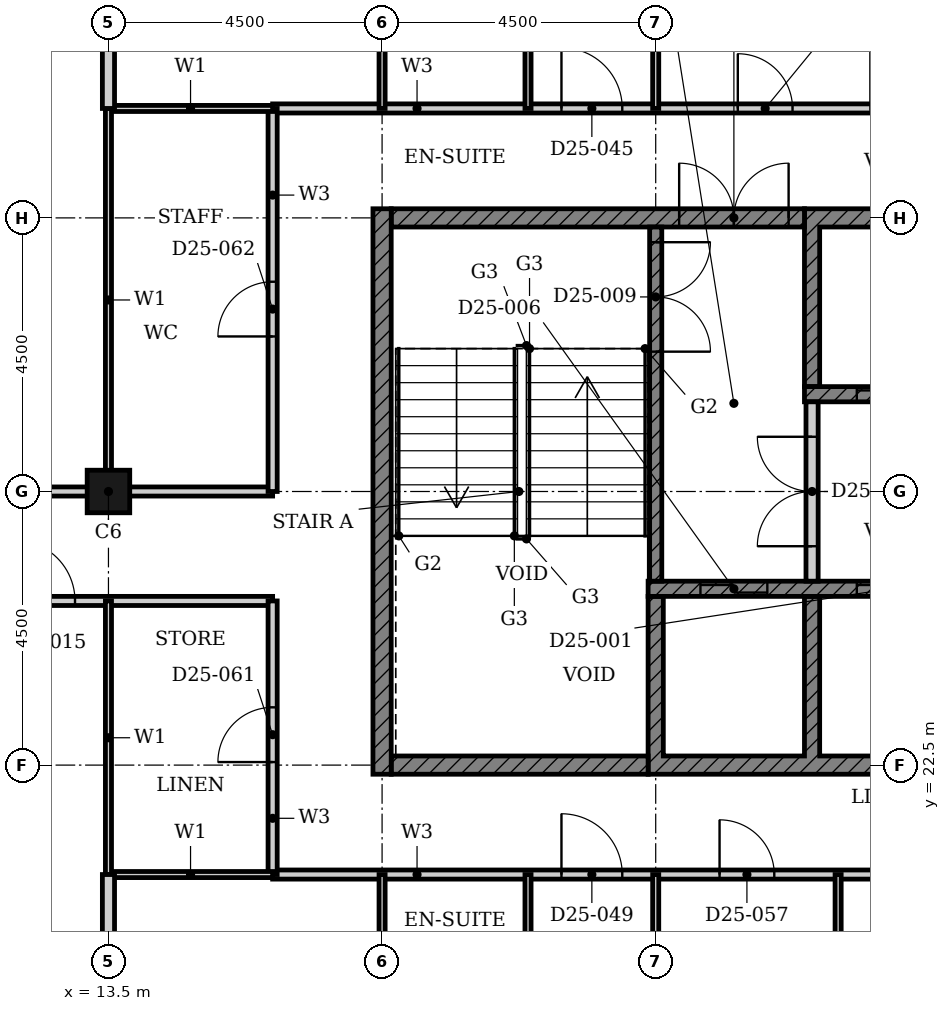
"""IFC4 building model, lengths in metres.
Left out: names, types, materials, properties, quantities, classifications, styles, units other than length and angle.
Written with IfcOpenShell. Run it as: python <this file> out.ifc"""

import sys

from ifc_helpers import new_model, si_unit, direction, frame, frame_2d, origin, origin_2d, place, context, subcontext, project, spatial, polyline, rectangle, hollow_rectangle, outline, extrude, element, fill, save


model = new_model("IFC4")
c1 = context("Model", 3, precision=1e-05, world=origin(), true_north=direction((0.0, 1.0)))
c2 = subcontext(c1, "Body", "Model", "MODEL_VIEW")
j1 = project(units=[si_unit("LENGTHUNIT", "METRE"), si_unit("PLANEANGLEUNIT", "RADIAN")], contexts=[c1])
p1 = place(None, origin())
s1 = spatial("IfcSite", under=j1, at=p1, CompositionType="ELEMENT")
p2 = place(p1, origin())
s2 = spatial("IfcBuilding", under=s1, at=p2, CompositionType="ELEMENT")
p3 = place(p2, frame((0.0, 0.0, 104.4)))
s3 = spatial("IfcBuildingStorey", under=s2, at=p3, CompositionType="ELEMENT", Elevation=104.4)
p4 = place(p3, frame((13.5, 27.0, 0.0), z_axis=(0.0, 0.0, 1.0), x_axis=(1.0, 0.0, 0.0)))
e1 = element("IfcColumn", 1, at=p4, inside=s3, PredefinedType="COLUMN", context=c2, shape_type="SweptSolid", body=[
    extrude(hollow_rectangle(XDim=0.7, YDim=0.7, WallThickness=0.022, at=origin_2d()), origin(), (0.0, 0.0, 1.0), 3.6),
])
p5 = place(p3, origin())
e2 = element("IfcWall", 2, at=p5, inside=s3, PredefinedType="SHEAR", context=c2, shape_type="SweptSolid", body=[
    extrude(outline(polyline([(22.375, 22.35), (38.053, 22.35), (38.053, 25.275), (37.803, 25.275), (37.803, 22.65), (35.482, 22.65), (35.482, 25.275), (35.232, 25.275), (35.232, 22.65), (32.911, 22.65), (32.911, 25.275), (32.661, 25.275), (32.661, 22.65), (30.339, 22.65), (30.339, 25.275), (30.089, 25.275), (30.089, 22.65), (27.768, 22.65), (27.768, 25.275), (27.518, 25.275), (27.518, 22.65), (25.197, 22.65), (25.197, 25.275), (24.947, 25.275), (24.947, 22.65), (22.625, 22.65), (22.625, 25.275), (22.375, 25.275), (22.375, 22.35)])), origin(), (0.0, 0.0, 1.0), 3.3),
])
p6 = place(p3, origin())
e3 = element("IfcWall", 3, at=p6, inside=s3, PredefinedType="SHEAR", context=c2, shape_type="SweptSolid", body=[
    extrude(outline(polyline([(24.947, 28.725), (25.197, 28.725), (25.197, 31.35), (27.518, 31.35), (27.518, 28.725), (27.768, 28.725), (27.768, 31.35), (30.089, 31.35), (30.089, 28.725), (30.339, 28.725), (30.339, 31.35), (32.661, 31.35), (32.661, 28.725), (32.911, 28.725), (32.911, 31.35), (35.232, 31.35), (35.232, 28.725), (35.482, 28.725), (35.482, 31.35), (37.803, 31.35), (37.803, 28.725), (38.053, 28.725), (38.053, 31.35), (40.375, 31.35), (40.375, 28.725), (40.625, 28.725), (40.625, 31.65), (24.947, 31.65), (24.947, 28.725)])), origin(), (0.0, 0.0, 1.0), 3.3),
])
p7 = place(p3, frame((18.15, 22.5, 0.0), z_axis=(0.0, 0.0, 1.0), x_axis=(1.0, 0.0, 0.0)))
e4 = element("IfcWall", 4, at=p7, inside=s3, PredefinedType="SHEAR", context=c2, shape_type="SweptSolid", body=[
    extrude(rectangle(XDim=4.225, YDim=0.3, at=frame_2d((2.113, 0.0))), origin(), (0.0, 0.0, 1.0), 3.3),
])
p8 = place(p3, frame((18.15, 31.5, 0.0), z_axis=(0.0, 0.0, 1.0), x_axis=(1.0, 0.0, 0.0)))
e5 = element("IfcWall", 5, at=p8, inside=s3, PredefinedType="SHEAR", context=c2, shape_type="SweptSolid", body=[
    extrude(rectangle(XDim=6.797, YDim=0.3, at=frame_2d((3.398, 0.0))), origin(), (0.0, 0.0, 1.0), 3.3),
])
p9 = place(p8, frame((4.736, 0.0, 0.0)))
e6 = element("IfcOpeningElement", 6, at=p9, cuts=e5, PredefinedType="OPENING", context=c2, shape_type="SweptSolid", body=[
    extrude(rectangle(XDim=1.8, YDim=2.1, at=frame_2d((0.9, 1.05))), frame((0.0, 0.16, 0.0), z_axis=(0.0, -1.0, 0.0), x_axis=(1.0, 0.0, 0.0)), (0.0, 0.0, 1.0), 0.32),
])
p10 = place(p3, frame((18.0, 22.35, 0.0), z_axis=(0.0, 0.0, 1.0), x_axis=(0.0, 1.0, 0.0)))
e7 = element("IfcWall", 7, at=p10, inside=s3, PredefinedType="SHEAR", context=c2, shape_type="SweptSolid", body=[
    extrude(rectangle(XDim=9.3, YDim=0.3, at=frame_2d((4.65, 0.0))), origin(), (0.0, 0.0, 1.0), 3.3),
])
p11 = place(p3, frame((22.375, 25.4, 0.0), z_axis=(0.0, 0.0, 1.0), x_axis=(1.0, 0.0, 0.0)))
e8 = element("IfcWall", 8, at=p11, inside=s3, PredefinedType="SHEAR", context=c2, shape_type="SweptSolid", body=[
    extrude(rectangle(XDim=15.678, YDim=0.25, at=frame_2d((7.839, 0.0))), origin(), (0.0, 0.0, 1.0), 3.3),
])
p12 = place(p11, frame((3.432, 0.0, 0.0)))
e9 = element("IfcOpeningElement", 9, at=p12, cuts=e8, PredefinedType="OPENING", context=c2, shape_type="SweptSolid", body=[
    extrude(rectangle(XDim=1.1, YDim=2.1, at=frame_2d((0.55, 1.05))), frame((0.0, 0.135, 0.0), z_axis=(0.0, -1.0, 0.0), x_axis=(1.0, 0.0, 0.0)), (0.0, 0.0, 1.0), 0.27),
])
p13 = place(p11, frame((11.146, 0.0, 0.0)))
e10 = element("IfcOpeningElement", 10, at=p13, cuts=e8, PredefinedType="OPENING", context=c2, shape_type="SweptSolid", body=[
    extrude(rectangle(XDim=1.1, YDim=2.1, at=frame_2d((0.55, 1.05))), frame((0.0, 0.135, 0.0), z_axis=(0.0, -1.0, 0.0), x_axis=(1.0, 0.0, 0.0)), (0.0, 0.0, 1.0), 0.27),
])
p14 = place(p11, frame((13.718, 0.0, 0.0)))
e11 = element("IfcOpeningElement", 11, at=p14, cuts=e8, PredefinedType="OPENING", context=c2, shape_type="SweptSolid", body=[
    extrude(rectangle(XDim=1.1, YDim=2.1, at=frame_2d((0.55, 1.05))), frame((0.0, 0.135, 0.0), z_axis=(0.0, -1.0, 0.0), x_axis=(1.0, 0.0, 0.0)), (0.0, 0.0, 1.0), 0.27),
])
p15 = place(p11, frame((0.861, 0.0, 0.0)))
e12 = element("IfcOpeningElement", 12, at=p15, cuts=e8, PredefinedType="OPENING", context=c2, shape_type="SweptSolid", body=[
    extrude(rectangle(XDim=1.1, YDim=2.1, at=frame_2d((0.55, 1.05))), frame((0.0, 0.135, 0.0), z_axis=(0.0, -1.0, 0.0), x_axis=(1.0, 0.0, 0.0)), (0.0, 0.0, 1.0), 0.27),
])
p16 = place(p3, frame((24.947, 28.6, 0.0), z_axis=(0.0, 0.0, 1.0), x_axis=(1.0, 0.0, 0.0)))
e13 = element("IfcWall", 13, at=p16, inside=s3, PredefinedType="SHEAR", context=c2, shape_type="SweptSolid", body=[
    extrude(rectangle(XDim=15.678, YDim=0.25, at=frame_2d((7.839, 0.0))), origin(), (0.0, 0.0, 1.0), 3.3),
])
p17 = place(p16, frame((0.861, 0.0, 0.0)))
e14 = element("IfcOpeningElement", 14, at=p17, cuts=e13, PredefinedType="OPENING", context=c2, shape_type="SweptSolid", body=[
    extrude(rectangle(XDim=1.1, YDim=2.1, at=frame_2d((0.55, 1.05))), frame((0.0, 0.135, 0.0), z_axis=(0.0, -1.0, 0.0), x_axis=(1.0, 0.0, 0.0)), (0.0, 0.0, 1.0), 0.27),
])
p18 = place(p16, frame((8.575, 0.0, 0.0)))
e15 = element("IfcOpeningElement", 15, at=p18, cuts=e13, PredefinedType="OPENING", context=c2, shape_type="SweptSolid", body=[
    extrude(rectangle(XDim=1.1, YDim=2.1, at=frame_2d((0.55, 1.05))), frame((0.0, 0.135, 0.0), z_axis=(0.0, -1.0, 0.0), x_axis=(1.0, 0.0, 0.0)), (0.0, 0.0, 1.0), 0.27),
])
p19 = place(p16, frame((13.718, 0.0, 0.0)))
e16 = element("IfcOpeningElement", 16, at=p19, cuts=e13, PredefinedType="OPENING", context=c2, shape_type="SweptSolid", body=[
    extrude(rectangle(XDim=1.1, YDim=2.1, at=frame_2d((0.55, 1.05))), frame((0.0, 0.135, 0.0), z_axis=(0.0, -1.0, 0.0), x_axis=(1.0, 0.0, 0.0)), (0.0, 0.0, 1.0), 0.27),
])
p20 = place(p3, frame((22.5, 31.35, 0.0), z_axis=(0.0, 0.0, 1.0), x_axis=(0.0, -1.0, 0.0)))
e17 = element("IfcWall", 17, at=p20, inside=s3, PredefinedType="SHEAR", context=c2, shape_type="SweptSolid", body=[
    extrude(rectangle(XDim=5.825, YDim=0.2, at=frame_2d((2.913, 0.0))), origin(), (0.0, 0.0, 1.0), 3.3),
])
p21 = place(p20, frame((0.25, 0.0, 0.0)))
e18 = element("IfcOpeningElement", 18, at=p21, cuts=e17, PredefinedType="OPENING", context=c2, shape_type="SweptSolid", body=[
    extrude(rectangle(XDim=1.8, YDim=2.1, at=frame_2d((0.9, 1.05))), frame((0.0, 0.11, 0.0), z_axis=(0.0, -1.0, 0.0), x_axis=(1.0, 0.0, 0.0)), (0.0, 0.0, 1.0), 0.22),
])
p22 = place(p3, frame((25.072, 25.525, 0.0), z_axis=(0.0, 0.0, 1.0), x_axis=(0.0, 1.0, 0.0)))
e19 = element("IfcWall", 19, at=p22, inside=s3, PredefinedType="PARTITIONING", context=c2, shape_type="SweptSolid", body=[
    extrude(rectangle(XDim=2.95, YDim=0.2, at=frame_2d((1.475, 0.0))), origin(), (0.0, 0.0, 1.0), 3.3),
])
p23 = place(p22, frame((0.575, 0.0, 0.0)))
e20 = element("IfcOpeningElement", 20, at=p23, cuts=e19, PredefinedType="OPENING", context=c2, shape_type="SweptSolid", body=[
    extrude(rectangle(XDim=1.8, YDim=2.1, at=frame_2d((0.9, 1.05))), frame((0.0, 0.11, 0.0), z_axis=(0.0, -1.0, 0.0), x_axis=(1.0, 0.0, 0.0)), (0.0, 0.0, 1.0), 0.22),
])
p24 = place(p3, frame((16.2, 20.7, 0.0), z_axis=(0.0, 0.0, 1.0), x_axis=(1.0, 0.0, 0.0)))
e21 = element("IfcWall", 21, at=p24, inside=s3, PredefinedType="PARTITIONING", context=c2, shape_type="SweptSolid", body=[
    extrude(rectangle(XDim=13.5, YDim=0.15, at=frame_2d((6.75, 0.0))), origin(), (0.0, 0.0, 1.0), 3.3),
])
p25 = place(p24, frame((4.75, 0.0, 0.0)))
e22 = element("IfcOpeningElement", 22, at=p25, cuts=e21, PredefinedType="OPENING", context=c2, shape_type="SweptSolid", body=[
    extrude(rectangle(XDim=1.0, YDim=2.1, at=frame_2d((0.5, 1.05))), frame((0.0, 0.085, 0.0), z_axis=(0.0, -1.0, 0.0), x_axis=(1.0, 0.0, 0.0)), (0.0, 0.0, 1.0), 0.17),
])
p26 = place(p24, frame((7.35, 0.0, 0.0)))
e23 = element("IfcOpeningElement", 23, at=p26, cuts=e21, PredefinedType="OPENING", context=c2, shape_type="SweptSolid", body=[
    extrude(rectangle(XDim=0.9, YDim=2.1, at=frame_2d((0.45, 1.05))), frame((0.0, 0.085, 0.0), z_axis=(0.0, -1.0, 0.0), x_axis=(1.0, 0.0, 0.0)), (0.0, 0.0, 1.0), 0.17),
])
p27 = place(p24, frame((10.95, 0.0, 0.0)))
e24 = element("IfcOpeningElement", 24, at=p27, cuts=e21, PredefinedType="OPENING", context=c2, shape_type="SweptSolid", body=[
    extrude(rectangle(XDim=0.9, YDim=2.1, at=frame_2d((0.45, 1.05))), frame((0.0, 0.085, 0.0), z_axis=(0.0, -1.0, 0.0), x_axis=(1.0, 0.0, 0.0)), (0.0, 0.0, 1.0), 0.17),
])
p28 = place(p3, frame((4.5, 25.2, 0.0), z_axis=(0.0, 0.0, 1.0), x_axis=(1.0, 0.0, 0.0)))
e25 = element("IfcWall", 25, at=p28, inside=s3, PredefinedType="PARTITIONING", context=c2, shape_type="SweptSolid", body=[
    extrude(rectangle(XDim=11.7, YDim=0.15, at=frame_2d((5.85, 0.0))), origin(), (0.0, 0.0, 1.0), 3.3),
])
p29 = place(p28, frame((7.45, 0.0, 0.0)))
e26 = element("IfcOpeningElement", 26, at=p29, cuts=e25, PredefinedType="OPENING", context=c2, shape_type="SweptSolid", body=[
    extrude(rectangle(XDim=1.0, YDim=2.1, at=frame_2d((0.5, 1.05))), frame((0.0, 0.085, 0.0), z_axis=(0.0, -1.0, 0.0), x_axis=(1.0, 0.0, 0.0)), (0.0, 0.0, 1.0), 0.17),
])
p30 = place(p28, frame((2.95, 0.0, 0.0)))
e27 = element("IfcOpeningElement", 27, at=p30, cuts=e25, PredefinedType="OPENING", context=c2, shape_type="SweptSolid", body=[
    extrude(rectangle(XDim=1.0, YDim=2.1, at=frame_2d((0.5, 1.05))), frame((0.0, 0.085, 0.0), z_axis=(0.0, -1.0, 0.0), x_axis=(1.0, 0.0, 0.0)), (0.0, 0.0, 1.0), 0.17),
])
p31 = place(p3, frame((4.5, 27.0, 0.0), z_axis=(0.0, 0.0, 1.0), x_axis=(1.0, 0.0, 0.0)))
e28 = element("IfcWall", 28, at=p31, inside=s3, PredefinedType="PARTITIONING", context=c2, shape_type="SweptSolid", body=[
    extrude(rectangle(XDim=11.7, YDim=0.15, at=frame_2d((5.85, 0.0))), origin(), (0.0, 0.0, 1.0), 2.58),
])
p32 = place(p31, frame((6.25, 0.0, 0.0)))
e29 = element("IfcOpeningElement", 29, at=p32, cuts=e28, PredefinedType="OPENING", context=c2, shape_type="SweptSolid", body=[
    extrude(rectangle(XDim=1.0, YDim=2.1, at=frame_2d((0.5, 1.05))), frame((0.0, 0.085, 0.0), z_axis=(0.0, -1.0, 0.0), x_axis=(1.0, 0.0, 0.0)), (0.0, 0.0, 1.0), 0.17),
])
p33 = place(p3, frame((16.2, 33.3, 0.0), z_axis=(0.0, 0.0, 1.0), x_axis=(1.0, 0.0, 0.0)))
e30 = element("IfcWall", 30, at=p33, inside=s3, PredefinedType="PARTITIONING", context=c2, shape_type="SweptSolid", body=[
    extrude(rectangle(XDim=15.3, YDim=0.15, at=frame_2d((7.65, 0.0))), origin(), (0.0, 0.0, 1.0), 3.3),
])
p34 = place(p33, frame((4.75, 0.0, 0.0)))
e31 = element("IfcOpeningElement", 31, at=p34, cuts=e30, PredefinedType="OPENING", context=c2, shape_type="SweptSolid", body=[
    extrude(rectangle(XDim=1.0, YDim=2.1, at=frame_2d((0.5, 1.05))), frame((0.0, 0.085, 0.0), z_axis=(0.0, -1.0, 0.0), x_axis=(1.0, 0.0, 0.0)), (0.0, 0.0, 1.0), 0.17),
])
p35 = place(p33, frame((7.65, 0.0, 0.0)))
e32 = element("IfcOpeningElement", 32, at=p35, cuts=e30, PredefinedType="OPENING", context=c2, shape_type="SweptSolid", body=[
    extrude(rectangle(XDim=0.9, YDim=2.1, at=frame_2d((0.45, 1.05))), frame((0.0, 0.085, 0.0), z_axis=(0.0, -1.0, 0.0), x_axis=(1.0, 0.0, 0.0)), (0.0, 0.0, 1.0), 0.17),
])
p36 = place(p33, frame((12.15, 0.0, 0.0)))
e33 = element("IfcOpeningElement", 33, at=p36, cuts=e30, PredefinedType="OPENING", context=c2, shape_type="SweptSolid", body=[
    extrude(rectangle(XDim=0.9, YDim=2.1, at=frame_2d((0.45, 1.05))), frame((0.0, 0.085, 0.0), z_axis=(0.0, -1.0, 0.0), x_axis=(1.0, 0.0, 0.0)), (0.0, 0.0, 1.0), 0.17),
])
p37 = place(p3, frame((16.2, 27.0, 0.0), z_axis=(0.0, 0.0, 1.0), x_axis=(0.0, 1.0, 0.0)))
e34 = element("IfcWall", 34, at=p37, inside=s3, PredefinedType="PARTITIONING", context=c2, shape_type="SweptSolid", body=[
    extrude(rectangle(XDim=6.3, YDim=0.15, at=frame_2d((3.15, 0.0))), origin(), (0.0, 0.0, 1.0), 3.3),
])
p38 = place(p37, frame((2.55, 0.0, 0.0)))
e35 = element("IfcOpeningElement", 35, at=p38, cuts=e34, PredefinedType="OPENING", context=c2, shape_type="SweptSolid", body=[
    extrude(rectangle(XDim=0.9, YDim=2.1, at=frame_2d((0.45, 1.05))), frame((0.0, 0.085, 0.0), z_axis=(0.0, -1.0, 0.0), x_axis=(1.0, 0.0, 0.0)), (0.0, 0.0, 1.0), 0.17),
])
p39 = place(p3, frame((16.2, 20.7, 0.0), z_axis=(0.0, 0.0, 1.0), x_axis=(0.0, 1.0, 0.0)))
e36 = element("IfcWall", 36, at=p39, inside=s3, PredefinedType="PARTITIONING", context=c2, shape_type="SweptSolid", body=[
    extrude(rectangle(XDim=4.5, YDim=0.15, at=frame_2d((2.25, 0.0))), origin(), (0.0, 0.0, 1.0), 3.3),
])
p40 = place(p39, frame((1.85, 0.0, 0.0)))
e37 = element("IfcOpeningElement", 37, at=p40, cuts=e36, PredefinedType="OPENING", context=c2, shape_type="SweptSolid", body=[
    extrude(rectangle(XDim=0.9, YDim=2.1, at=frame_2d((0.45, 1.05))), frame((0.0, 0.085, 0.0), z_axis=(0.0, -1.0, 0.0), x_axis=(1.0, 0.0, 0.0)), (0.0, 0.0, 1.0), 0.17),
])
for number, where, z_axis, x_axis in (
    (38, (13.5, 20.7, 0.0), (0.0, 0.0, 1.0), (1.0, 0.0, 0.0)),
    (39, (13.5, 33.3, 0.0), (0.0, 0.0, 1.0), (1.0, 0.0, 0.0)),
):
    element("IfcWall", number, at=place(p3, frame(where, z_axis=z_axis, x_axis=x_axis)), inside=s3, PredefinedType="PARTITIONING", context=c2, shape_type="SweptSolid", body=[
        extrude(rectangle(XDim=2.7, YDim=0.1, at=frame_2d((1.35, 0.0))), origin(), (0.0, 0.0, 1.0), 3.3),
    ])
p41 = place(p3, frame((13.5, 20.7, 0.0), z_axis=(0.0, 0.0, 1.0), x_axis=(0.0, 1.0, 0.0)))
e40 = element("IfcWall", 40, at=p41, inside=s3, PredefinedType="PARTITIONING", context=c2, shape_type="SweptSolid", body=[
    extrude(rectangle(XDim=4.5, YDim=0.1, at=frame_2d((2.25, 0.0))), origin(), (0.0, 0.0, 1.0), 2.38),
])
p42 = place(p3, frame((13.5, 27.0, 0.0), z_axis=(0.0, 0.0, 1.0), x_axis=(0.0, 1.0, 0.0)))
e41 = element("IfcWall", 41, at=p42, inside=s3, PredefinedType="PARTITIONING", context=c2, shape_type="SweptSolid", body=[
    extrude(rectangle(XDim=6.3, YDim=0.1, at=frame_2d((3.15, 0.0))), origin(), (0.0, 0.0, 1.0), 2.38),
])
for number, where, z_axis, x_axis in (
    (42, (22.5, 33.3, 0.0), (0.0, 0.0, 1.0), (0.0, 1.0, 0.0)),
    (43, (22.5, 13.31, 0.0), (0.0, 0.0, 1.0), (0.0, 1.0, 0.0)),
):
    element("IfcWall", number, at=place(p3, frame(where, z_axis=z_axis, x_axis=x_axis)), inside=s3, PredefinedType="PARTITIONING", context=c2, shape_type="SweptSolid", body=[
        extrude(rectangle(XDim=7.39, YDim=0.1, at=frame_2d((3.695, 0.0))), origin(), (0.0, 0.0, 1.0), 3.3),
    ])
p43 = place(p3, frame((25.5, 13.5, 0.0), z_axis=(0.0, 0.0, 1.0), x_axis=(0.0, 1.0, 0.0)))
e44 = element("IfcWall", 44, at=p43, inside=s3, PredefinedType="PARTITIONING", context=c2, shape_type="SweptSolid", body=[
    extrude(rectangle(XDim=7.2, YDim=0.1, at=frame_2d((3.6, 0.0))), origin(), (0.0, 0.0, 1.0), 3.3),
])
for number, where, z_axis, x_axis in (
    (45, (13.5, 17.81, 0.0), (0.0, 0.0, 1.0), (0.0, 1.0, 0.0)),
    (46, (13.5, 33.3, 0.0), (0.0, 0.0, 1.0), (0.0, 1.0, 0.0)),
):
    element("IfcWall", number, at=place(p3, frame(where, z_axis=z_axis, x_axis=x_axis)), inside=s3, PredefinedType="PARTITIONING", context=c2, shape_type="SweptSolid", body=[
        extrude(rectangle(XDim=2.89, YDim=0.2, at=frame_2d((1.445, 0.0))), origin(), (0.0, 0.0, 1.0), 2.38),
    ])
for number, where, z_axis, x_axis in (
    (47, (18.0, 33.3, 0.0), (0.0, 0.0, 1.0), (0.0, 1.0, 0.0)),
    (48, (18.0, 18.0, 0.0), (0.0, 0.0, 1.0), (0.0, 1.0, 0.0)),
    (49, (20.4, 33.3, 0.0), (0.0, 0.0, 1.0), (0.0, 1.0, 0.0)),
    (50, (20.4, 18.0, 0.0), (0.0, 0.0, 1.0), (0.0, 1.0, 0.0)),
):
    element("IfcWall", number, at=place(p3, frame(where, z_axis=z_axis, x_axis=x_axis)), inside=s3, PredefinedType="PARTITIONING", context=c2, shape_type="SweptSolid", body=[
        extrude(rectangle(XDim=2.7, YDim=0.1, at=frame_2d((1.35, 0.0))), origin(), (0.0, 0.0, 1.0), 3.3),
    ])
p44 = place(p12, origin())
e51 = element("IfcDoor", 51, at=p44, inside=s3, OperationType="DOUBLE_DOOR_SLIDING", PredefinedType="DOOR", context=c2, shape_type="SweptSolid", body=[
    extrude(rectangle(XDim=1.1, YDim=2.1, at=frame_2d((0.55, 1.05))), frame((0.0, 0.025, 0.0), z_axis=(0.0, -1.0, 0.0), x_axis=(1.0, 0.0, 0.0)), (0.0, 0.0, 1.0), 0.05),
])
fill(e9, e51)
p45 = place(p17, origin())
e52 = element("IfcDoor", 52, at=p45, inside=s3, OperationType="DOUBLE_DOOR_SLIDING", PredefinedType="DOOR", context=c2, shape_type="SweptSolid", body=[
    extrude(rectangle(XDim=1.1, YDim=2.1, at=frame_2d((0.55, 1.05))), frame((0.0, 0.025, 0.0), z_axis=(0.0, -1.0, 0.0), x_axis=(1.0, 0.0, 0.0)), (0.0, 0.0, 1.0), 0.05),
])
fill(e14, e52)
p46 = place(p15, origin())
e53 = element("IfcDoor", 53, at=p46, inside=s3, OperationType="DOUBLE_DOOR_SLIDING", PredefinedType="DOOR", context=c2, shape_type="SweptSolid", body=[
    extrude(rectangle(XDim=1.1, YDim=2.1, at=frame_2d((0.55, 1.05))), frame((0.0, 0.025, 0.0), z_axis=(0.0, -1.0, 0.0), x_axis=(1.0, 0.0, 0.0)), (0.0, 0.0, 1.0), 0.05),
])
fill(e12, e53)
p47 = place(p21, origin())
e54 = element("IfcDoor", 54, at=p47, inside=s3, OperationType="DOUBLE_DOOR_SINGLE_SWING", PredefinedType="DOOR", context=c2, shape_type="SweptSolid", body=[
    extrude(rectangle(XDim=1.8, YDim=2.1, at=frame_2d((0.9, 1.05))), frame((0.0, 0.025, 0.0), z_axis=(0.0, -1.0, 0.0), x_axis=(1.0, 0.0, 0.0)), (0.0, 0.0, 1.0), 0.05),
])
fill(e18, e54)
p48 = place(p23, origin())
e55 = element("IfcDoor", 55, at=p48, inside=s3, OperationType="DOUBLE_DOOR_SINGLE_SWING", PredefinedType="DOOR", context=c2, shape_type="SweptSolid", body=[
    extrude(rectangle(XDim=1.8, YDim=2.1, at=frame_2d((0.9, 1.05))), frame((0.0, 0.025, 0.0), z_axis=(0.0, -1.0, 0.0), x_axis=(1.0, 0.0, 0.0)), (0.0, 0.0, 1.0), 0.05),
])
fill(e20, e55)
p49 = place(p9, origin())
e56 = element("IfcDoor", 56, at=p49, inside=s3, OperationType="DOUBLE_DOOR_SINGLE_SWING", PredefinedType="DOOR", context=c2, shape_type="SweptSolid", body=[
    extrude(rectangle(XDim=1.8, YDim=2.1, at=frame_2d((0.9, 1.05))), frame((0.0, 0.025, 0.0), z_axis=(0.0, -1.0, 0.0), x_axis=(1.0, 0.0, 0.0)), (0.0, 0.0, 1.0), 0.05),
])
fill(e6, e56)
p50 = place(p29, origin())
e57 = element("IfcDoor", 57, at=p50, inside=s3, OperationType="SINGLE_SWING_RIGHT", PredefinedType="DOOR", context=c2, shape_type="SweptSolid", body=[
    extrude(rectangle(XDim=1.0, YDim=2.1, at=frame_2d((0.5, 1.05))), frame((0.0, 0.025, 0.0), z_axis=(0.0, -1.0, 0.0), x_axis=(1.0, 0.0, 0.0)), (0.0, 0.0, 1.0), 0.05),
])
fill(e26, e57)
p51 = place(p34, origin())
e58 = element("IfcDoor", 58, at=p51, inside=s3, OperationType="SINGLE_SWING_RIGHT", PredefinedType="DOOR", context=c2, shape_type="SweptSolid", body=[
    extrude(rectangle(XDim=1.0, YDim=2.1, at=frame_2d((0.5, 1.05))), frame((0.0, 0.025, 0.0), z_axis=(0.0, -1.0, 0.0), x_axis=(1.0, 0.0, 0.0)), (0.0, 0.0, 1.0), 0.05),
])
fill(e31, e58)
p52 = place(p25, origin())
e59 = element("IfcDoor", 59, at=p52, inside=s3, OperationType="SINGLE_SWING_RIGHT", PredefinedType="DOOR", context=c2, shape_type="SweptSolid", body=[
    extrude(rectangle(XDim=1.0, YDim=2.1, at=frame_2d((0.5, 1.05))), frame((0.0, 0.025, 0.0), z_axis=(0.0, -1.0, 0.0), x_axis=(1.0, 0.0, 0.0)), (0.0, 0.0, 1.0), 0.05),
])
fill(e22, e59)
p53 = place(p35, origin())
e60 = element("IfcDoor", 60, at=p53, inside=s3, OperationType="SINGLE_SWING_RIGHT", PredefinedType="DOOR", context=c2, shape_type="SweptSolid", body=[
    extrude(rectangle(XDim=0.9, YDim=2.1, at=frame_2d((0.45, 1.05))), frame((0.0, 0.025, 0.0), z_axis=(0.0, -1.0, 0.0), x_axis=(1.0, 0.0, 0.0)), (0.0, 0.0, 1.0), 0.05),
])
fill(e32, e60)
p54 = place(p26, origin())
e61 = element("IfcDoor", 61, at=p54, inside=s3, OperationType="SINGLE_SWING_RIGHT", PredefinedType="DOOR", context=c2, shape_type="SweptSolid", body=[
    extrude(rectangle(XDim=0.9, YDim=2.1, at=frame_2d((0.45, 1.05))), frame((0.0, 0.025, 0.0), z_axis=(0.0, -1.0, 0.0), x_axis=(1.0, 0.0, 0.0)), (0.0, 0.0, 1.0), 0.05),
])
fill(e23, e61)
p55 = place(p40, origin())
e62 = element("IfcDoor", 62, at=p55, inside=s3, OperationType="SINGLE_SWING_LEFT", PredefinedType="DOOR", context=c2, shape_type="SweptSolid", body=[
    extrude(rectangle(XDim=0.9, YDim=2.1, at=frame_2d((0.45, 1.05))), frame((0.0, 0.025, 0.0), z_axis=(0.0, -1.0, 0.0), x_axis=(1.0, 0.0, 0.0)), (0.0, 0.0, 1.0), 0.05),
])
fill(e37, e62)
p56 = place(p38, origin())
e63 = element("IfcDoor", 63, at=p56, inside=s3, OperationType="SINGLE_SWING_LEFT", PredefinedType="DOOR", context=c2, shape_type="SweptSolid", body=[
    extrude(rectangle(XDim=0.9, YDim=2.1, at=frame_2d((0.45, 1.05))), frame((0.0, 0.025, 0.0), z_axis=(0.0, -1.0, 0.0), x_axis=(1.0, 0.0, 0.0)), (0.0, 0.0, 1.0), 0.05),
])
fill(e35, e63)
save(model, sys.argv[1])
